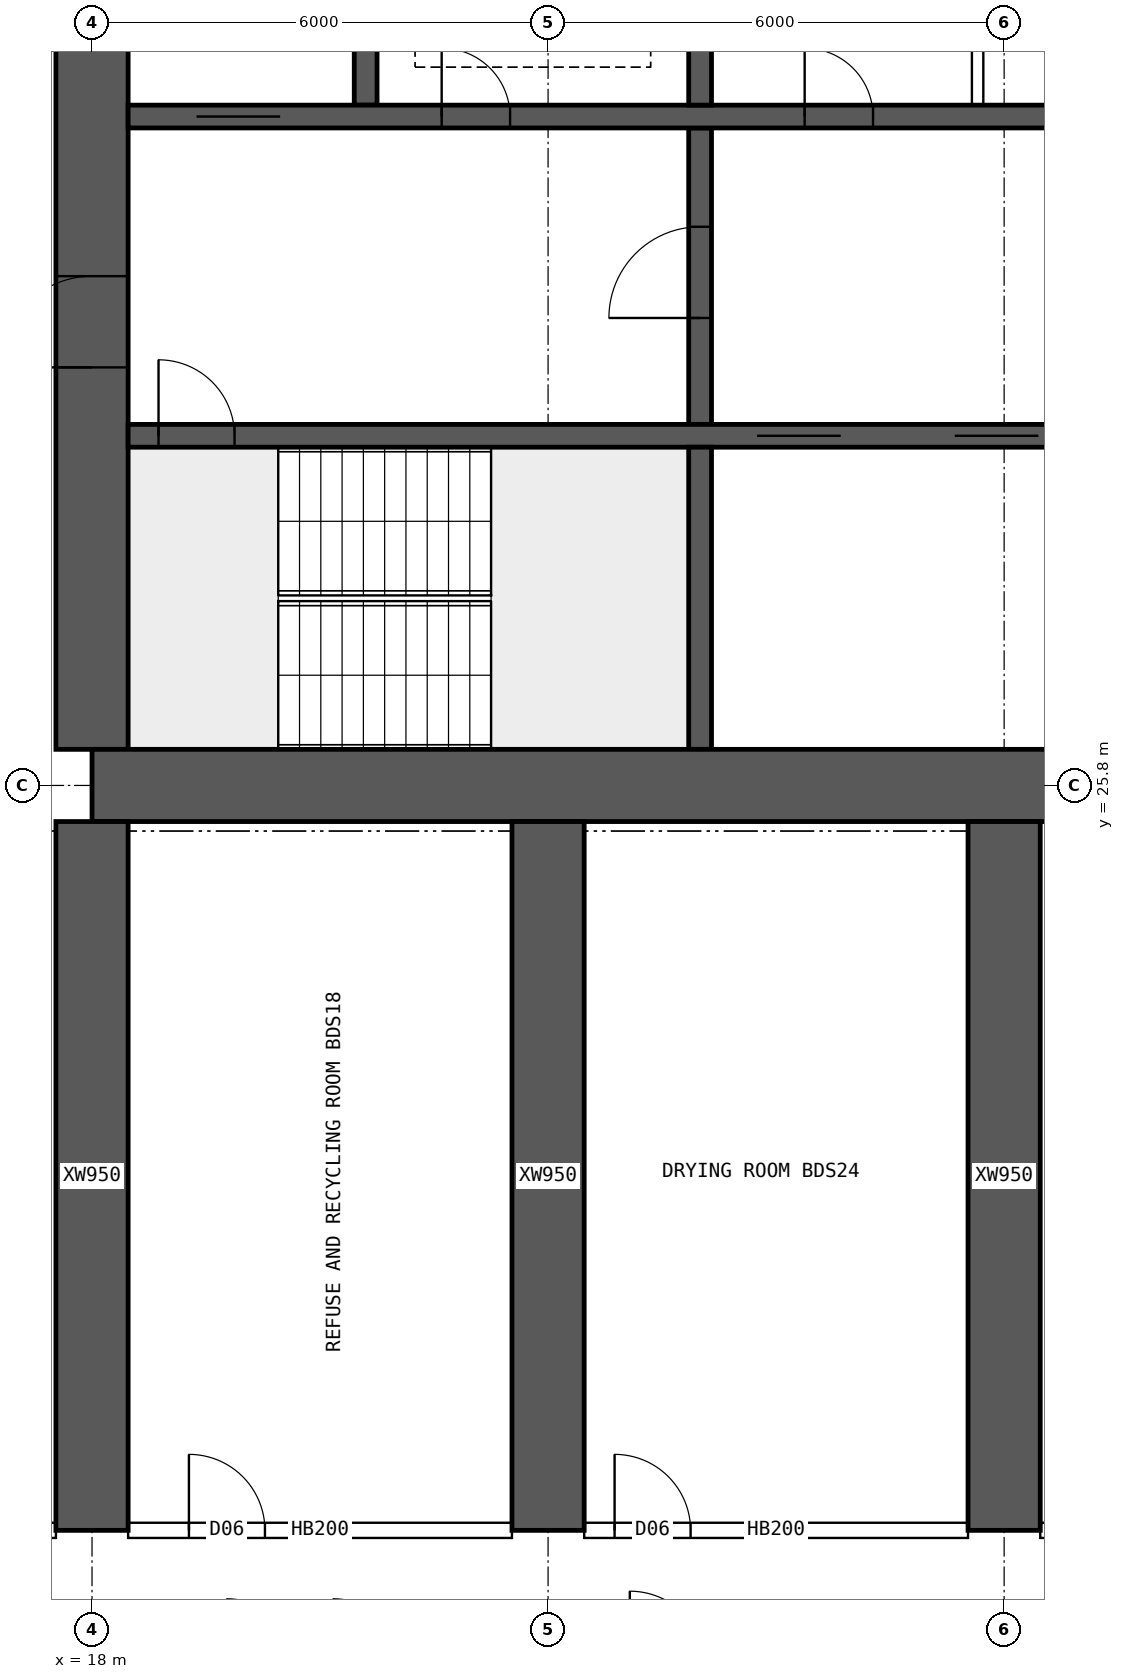
"""IFC4 building model, lengths in metres.
Left out: names, types, materials, properties, quantities, classifications, styles, units other than length and angle.
Written with IfcOpenShell. Run it as: python <this file> out.ifc"""

import sys

from ifc_helpers import new_model, si_unit, direction, frame, frame_2d, origin, place, context, subcontext, project, spatial, rectangle, extrude, element, fill, save


model = new_model("IFC4")
c1 = context("Model", 3, precision=1e-05, world=origin(), true_north=direction((0.0, 1.0)))
c2 = subcontext(c1, "Body", "Model", "MODEL_VIEW")
j1 = project(units=[si_unit("LENGTHUNIT", "METRE"), si_unit("PLANEANGLEUNIT", "RADIAN")], contexts=[c1])
p1 = place(None, origin())
s1 = spatial("IfcSite", under=j1, at=p1, CompositionType="ELEMENT")
p2 = place(p1, origin())
s2 = spatial("IfcBuilding", under=s1, at=p2, CompositionType="ELEMENT")
p3 = place(p2, frame((0.0, 0.0, 110.65)))
s3 = spatial("IfcBuildingStorey", under=s2, at=p3, CompositionType="ELEMENT", Elevation=110.65)
p4 = place(p3, frame((18.0, 25.8, 0.0), z_axis=(0.0, 0.0, 1.0), x_axis=(1.0, 0.0, 0.0)))
e1 = element("IfcWall", 1, at=p4, inside=s3, PredefinedType="SHEAR", context=c2, shape_type="SweptSolid", body=[
    extrude(rectangle(XDim=48.0, YDim=0.95, at=frame_2d((24.0, 0.0))), origin(), (0.0, 0.0, 1.0), 3.75),
])
p5 = place(p3, frame((18.0, 26.275, 0.0), z_axis=(0.0, 0.0, 1.0), x_axis=(0.0, 1.0, 0.0)))
e2 = element("IfcWall", 2, at=p5, inside=s3, PredefinedType="SHEAR", context=c2, shape_type="SweptSolid", body=[
    extrude(rectangle(XDim=11.45, YDim=0.95, at=frame_2d((5.725, 0.0))), origin(), (0.0, 0.0, 1.0), 3.75),
])
p6 = place(p5, frame((5.025, 0.0, 0.0)))
e3 = element("IfcOpeningElement", 3, at=p6, cuts=e2, PredefinedType="OPENING", context=c2, shape_type="SweptSolid", body=[
    extrude(rectangle(XDim=1.2, YDim=2.1, at=frame_2d((0.6, 1.05))), frame((0.0, 0.485, 0.0), z_axis=(0.0, -1.0, 0.0), x_axis=(1.0, 0.0, 0.0)), (0.0, 0.0, 1.0), 0.97),
])
p7 = place(p3, frame((18.475, 30.4, 0.0), z_axis=(0.0, 0.0, 1.0), x_axis=(1.0, 0.0, 0.0)))
e4 = element("IfcWall", 4, at=p7, inside=s3, PredefinedType="SHEAR", context=c2, shape_type="SweptSolid", body=[
    extrude(rectangle(XDim=47.05, YDim=0.3, at=frame_2d((23.525, 0.0))), origin(), (0.0, 0.0, 1.0), 3.75),
])
p8 = place(p7, frame((0.4, 0.0, 0.0)))
e5 = element("IfcOpeningElement", 5, at=p8, cuts=e4, PredefinedType="OPENING", context=c2, shape_type="SweptSolid", body=[
    extrude(rectangle(XDim=1.0, YDim=2.1, at=frame_2d((0.5, 1.05))), frame((0.0, 0.16, 0.0), z_axis=(0.0, -1.0, 0.0), x_axis=(1.0, 0.0, 0.0)), (0.0, 0.0, 1.0), 0.32),
])
p9 = place(p7, frame((45.65, 0.0, 0.0)))
e6 = element("IfcOpeningElement", 6, at=p9, cuts=e4, PredefinedType="OPENING", context=c2, shape_type="SweptSolid", body=[
    extrude(rectangle(XDim=1.0, YDim=2.1, at=frame_2d((0.5, 1.05))), frame((0.0, 0.16, 0.0), z_axis=(0.0, -1.0, 0.0), x_axis=(1.0, 0.0, 0.0)), (0.0, 0.0, 1.0), 0.32),
])
p10 = place(p7, frame((8.275, 0.0, 0.0)))
e7 = element("IfcOpeningElement", 7, at=p10, cuts=e4, PredefinedType="OPENING", context=c2, shape_type="SweptSolid", body=[
    extrude(rectangle(XDim=1.1, YDim=2.1, at=frame_2d((0.55, 1.05))), frame((0.0, 0.16, 0.0), z_axis=(0.0, -1.0, 0.0), x_axis=(1.0, 0.0, 0.0)), (0.0, 0.0, 1.0), 0.32),
])
p11 = place(p7, frame((10.875, 0.0, 0.0)))
e8 = element("IfcOpeningElement", 8, at=p11, cuts=e4, PredefinedType="OPENING", context=c2, shape_type="SweptSolid", body=[
    extrude(rectangle(XDim=1.1, YDim=2.1, at=frame_2d((0.55, 1.05))), frame((0.0, 0.16, 0.0), z_axis=(0.0, -1.0, 0.0), x_axis=(1.0, 0.0, 0.0)), (0.0, 0.0, 1.0), 0.32),
])
p12 = place(p7, frame((13.475, 0.0, 0.0)))
e9 = element("IfcOpeningElement", 9, at=p12, cuts=e4, PredefinedType="OPENING", context=c2, shape_type="SweptSolid", body=[
    extrude(rectangle(XDim=1.1, YDim=2.1, at=frame_2d((0.55, 1.05))), frame((0.0, 0.16, 0.0), z_axis=(0.0, -1.0, 0.0), x_axis=(1.0, 0.0, 0.0)), (0.0, 0.0, 1.0), 0.32),
])
p13 = place(p7, frame((16.075, 0.0, 0.0)))
e10 = element("IfcOpeningElement", 10, at=p13, cuts=e4, PredefinedType="OPENING", context=c2, shape_type="SweptSolid", body=[
    extrude(rectangle(XDim=1.1, YDim=2.1, at=frame_2d((0.55, 1.05))), frame((0.0, 0.16, 0.0), z_axis=(0.0, -1.0, 0.0), x_axis=(1.0, 0.0, 0.0)), (0.0, 0.0, 1.0), 0.32),
])
p14 = place(p7, frame((18.85, 0.0, 0.0)))
e11 = element("IfcOpeningElement", 11, at=p14, cuts=e4, PredefinedType="OPENING", context=c2, shape_type="SweptSolid", body=[
    extrude(rectangle(XDim=0.9, YDim=2.1, at=frame_2d((0.45, 1.05))), frame((0.0, 0.16, 0.0), z_axis=(0.0, -1.0, 0.0), x_axis=(1.0, 0.0, 0.0)), (0.0, 0.0, 1.0), 0.32),
])
p15 = place(p7, frame((30.142, 0.0, 0.0)))
e12 = element("IfcOpeningElement", 12, at=p15, cuts=e4, PredefinedType="OPENING", context=c2, shape_type="SweptSolid", body=[
    extrude(rectangle(XDim=1.1, YDim=2.1, at=frame_2d((0.55, 1.05))), frame((0.0, 0.16, 0.0), z_axis=(0.0, -1.0, 0.0), x_axis=(1.0, 0.0, 0.0)), (0.0, 0.0, 1.0), 0.32),
])
p16 = place(p7, frame((33.675, 0.0, 0.0)))
e13 = element("IfcOpeningElement", 13, at=p16, cuts=e4, PredefinedType="OPENING", context=c2, shape_type="SweptSolid", body=[
    extrude(rectangle(XDim=1.1, YDim=2.1, at=frame_2d((0.55, 1.05))), frame((0.0, 0.16, 0.0), z_axis=(0.0, -1.0, 0.0), x_axis=(1.0, 0.0, 0.0)), (0.0, 0.0, 1.0), 0.32),
])
p17 = place(p7, frame((37.208, 0.0, 0.0)))
e14 = element("IfcOpeningElement", 14, at=p17, cuts=e4, PredefinedType="OPENING", context=c2, shape_type="SweptSolid", body=[
    extrude(rectangle(XDim=1.1, YDim=2.1, at=frame_2d((0.55, 1.05))), frame((0.0, 0.16, 0.0), z_axis=(0.0, -1.0, 0.0), x_axis=(1.0, 0.0, 0.0)), (0.0, 0.0, 1.0), 0.32),
])
p18 = place(p3, frame((18.475, 34.6, 0.0), z_axis=(0.0, 0.0, 1.0), x_axis=(1.0, 0.0, 0.0)))
e15 = element("IfcWall", 15, at=p18, inside=s3, PredefinedType="SHEAR", context=c2, shape_type="SweptSolid", body=[
    extrude(rectangle(XDim=47.05, YDim=0.3, at=frame_2d((23.525, 0.0))), origin(), (0.0, 0.0, 1.0), 3.75),
])
p19 = place(p18, frame((0.9, 0.0, 0.0)))
e16 = element("IfcOpeningElement", 16, at=p19, cuts=e15, PredefinedType="OPENING", context=c2, shape_type="SweptSolid", body=[
    extrude(rectangle(XDim=1.1, YDim=2.1, at=frame_2d((0.55, 1.05))), frame((0.0, 0.16, 0.0), z_axis=(0.0, -1.0, 0.0), x_axis=(1.0, 0.0, 0.0)), (0.0, 0.0, 1.0), 0.32),
])
p20 = place(p18, frame((45.05, 0.0, 0.0)))
e17 = element("IfcOpeningElement", 17, at=p20, cuts=e15, PredefinedType="OPENING", context=c2, shape_type="SweptSolid", body=[
    extrude(rectangle(XDim=1.1, YDim=2.1, at=frame_2d((0.55, 1.05))), frame((0.0, 0.16, 0.0), z_axis=(0.0, -1.0, 0.0), x_axis=(1.0, 0.0, 0.0)), (0.0, 0.0, 1.0), 0.32),
])
p21 = place(p18, frame((4.125, 0.0, 0.0)))
e18 = element("IfcOpeningElement", 18, at=p21, cuts=e15, PredefinedType="OPENING", context=c2, shape_type="SweptSolid", body=[
    extrude(rectangle(XDim=0.9, YDim=2.1, at=frame_2d((0.45, 1.05))), frame((0.0, 0.16, 0.0), z_axis=(0.0, -1.0, 0.0), x_axis=(1.0, 0.0, 0.0)), (0.0, 0.0, 1.0), 0.32),
])
p22 = place(p18, frame((42.025, 0.0, 0.0)))
e19 = element("IfcOpeningElement", 19, at=p22, cuts=e15, PredefinedType="OPENING", context=c2, shape_type="SweptSolid", body=[
    extrude(rectangle(XDim=0.9, YDim=2.1, at=frame_2d((0.45, 1.05))), frame((0.0, 0.16, 0.0), z_axis=(0.0, -1.0, 0.0), x_axis=(1.0, 0.0, 0.0)), (0.0, 0.0, 1.0), 0.32),
])
p23 = place(p18, frame((8.9, 0.0, 0.0)))
e20 = element("IfcOpeningElement", 20, at=p23, cuts=e15, PredefinedType="OPENING", context=c2, shape_type="SweptSolid", body=[
    extrude(rectangle(XDim=0.9, YDim=2.1, at=frame_2d((0.45, 1.05))), frame((0.0, 0.16, 0.0), z_axis=(0.0, -1.0, 0.0), x_axis=(1.0, 0.0, 0.0)), (0.0, 0.0, 1.0), 0.32),
])
p24 = place(p18, frame((12.874, 0.0, 0.0)))
e21 = element("IfcOpeningElement", 21, at=p24, cuts=e15, PredefinedType="OPENING", context=c2, shape_type="SweptSolid", body=[
    extrude(rectangle(XDim=0.9, YDim=2.1, at=frame_2d((0.45, 1.05))), frame((0.0, 0.16, 0.0), z_axis=(0.0, -1.0, 0.0), x_axis=(1.0, 0.0, 0.0)), (0.0, 0.0, 1.0), 0.32),
])
p25 = place(p18, frame((16.521, 0.0, 0.0)))
e22 = element("IfcOpeningElement", 22, at=p25, cuts=e15, PredefinedType="OPENING", context=c2, shape_type="SweptSolid", body=[
    extrude(rectangle(XDim=0.9, YDim=2.1, at=frame_2d((0.45, 1.05))), frame((0.0, 0.16, 0.0), z_axis=(0.0, -1.0, 0.0), x_axis=(1.0, 0.0, 0.0)), (0.0, 0.0, 1.0), 0.32),
])
p26 = place(p18, frame((20.28, 0.0, 0.0)))
e23 = element("IfcOpeningElement", 23, at=p26, cuts=e15, PredefinedType="OPENING", context=c2, shape_type="SweptSolid", body=[
    extrude(rectangle(XDim=0.9, YDim=2.1, at=frame_2d((0.45, 1.05))), frame((0.0, 0.16, 0.0), z_axis=(0.0, -1.0, 0.0), x_axis=(1.0, 0.0, 0.0)), (0.0, 0.0, 1.0), 0.32),
])
p27 = place(p18, frame((24.686, 0.0, 0.0)))
e24 = element("IfcOpeningElement", 24, at=p27, cuts=e15, PredefinedType="OPENING", context=c2, shape_type="SweptSolid", body=[
    extrude(rectangle(XDim=0.9, YDim=2.1, at=frame_2d((0.45, 1.05))), frame((0.0, 0.16, 0.0), z_axis=(0.0, -1.0, 0.0), x_axis=(1.0, 0.0, 0.0)), (0.0, 0.0, 1.0), 0.32),
])
p28 = place(p18, frame((27.483, 0.0, 0.0)))
e25 = element("IfcOpeningElement", 25, at=p28, cuts=e15, PredefinedType="OPENING", context=c2, shape_type="SweptSolid", body=[
    extrude(rectangle(XDim=0.9, YDim=2.1, at=frame_2d((0.45, 1.05))), frame((0.0, 0.16, 0.0), z_axis=(0.0, -1.0, 0.0), x_axis=(1.0, 0.0, 0.0)), (0.0, 0.0, 1.0), 0.32),
])
p29 = place(p18, frame((29.856, 0.0, 0.0)))
e26 = element("IfcOpeningElement", 26, at=p29, cuts=e15, PredefinedType="OPENING", context=c2, shape_type="SweptSolid", body=[
    extrude(rectangle(XDim=0.9, YDim=2.1, at=frame_2d((0.45, 1.05))), frame((0.0, 0.16, 0.0), z_axis=(0.0, -1.0, 0.0), x_axis=(1.0, 0.0, 0.0)), (0.0, 0.0, 1.0), 0.32),
])
p30 = place(p18, frame((35.326, 0.0, 0.0)))
e27 = element("IfcOpeningElement", 27, at=p30, cuts=e15, PredefinedType="OPENING", context=c2, shape_type="SweptSolid", body=[
    extrude(rectangle(XDim=0.9, YDim=2.1, at=frame_2d((0.45, 1.05))), frame((0.0, 0.16, 0.0), z_axis=(0.0, -1.0, 0.0), x_axis=(1.0, 0.0, 0.0)), (0.0, 0.0, 1.0), 0.32),
])
p31 = place(p3, frame((26.0, 26.275, 0.0), z_axis=(0.0, 0.0, 1.0), x_axis=(0.0, 1.0, 0.0)))
e28 = element("IfcWall", 28, at=p31, inside=s3, PredefinedType="SHEAR", context=c2, shape_type="SweptSolid", body=[
    extrude(rectangle(XDim=3.975, YDim=0.3, at=frame_2d((1.988, 0.0))), origin(), (0.0, 0.0, 1.0), 3.75),
])
p32 = place(p3, frame((26.0, 30.55, 0.0), z_axis=(0.0, 0.0, 1.0), x_axis=(0.0, 1.0, 0.0)))
e29 = element("IfcWall", 29, at=p32, inside=s3, PredefinedType="SHEAR", context=c2, shape_type="SweptSolid", body=[
    extrude(rectangle(XDim=3.9, YDim=0.3, at=frame_2d((1.95, 0.0))), origin(), (0.0, 0.0, 1.0), 3.75),
])
p33 = place(p32, frame((1.4, 0.0, 0.0)))
e30 = element("IfcOpeningElement", 30, at=p33, cuts=e29, PredefinedType="OPENING", context=c2, shape_type="SweptSolid", body=[
    extrude(rectangle(XDim=1.2, YDim=2.1, at=frame_2d((0.6, 1.05))), frame((0.0, 0.16, 0.0), z_axis=(0.0, -1.0, 0.0), x_axis=(1.0, 0.0, 0.0)), (0.0, 0.0, 1.0), 0.32),
])
for number, where, z_axis, x_axis in (
    (31, (21.6, 34.75, 0.0), (0.0, 0.0, 1.0), (0.0, 1.0, 0.0)),
    (32, (26.0, 34.75, 0.0), (0.0, 0.0, 1.0), (0.0, 1.0, 0.0)),
):
    element("IfcWall", number, at=place(p3, frame(where, z_axis=z_axis, x_axis=x_axis)), inside=s3, PredefinedType="SHEAR", context=c2, shape_type="SweptSolid", body=[
        extrude(rectangle(XDim=2.975, YDim=0.3, at=frame_2d((1.488, 0.0))), origin(), (0.0, 0.0, 1.0), 3.75),
    ])
for number, where, z_axis, x_axis in (
    (33, (18.0, 16.0, 0.0), (0.0, 0.0, 1.0), (0.0, 1.0, 0.0)),
    (34, (24.0, 16.0, 0.0), (0.0, 0.0, 1.0), (0.0, 1.0, 0.0)),
    (35, (30.0, 16.0, 0.0), (0.0, 0.0, 1.0), (0.0, 1.0, 0.0)),
):
    element("IfcWall", number, at=place(p3, frame(where, z_axis=z_axis, x_axis=x_axis)), inside=s3, PredefinedType="SHEAR", context=c2, shape_type="SweptSolid", body=[
        extrude(rectangle(XDim=9.325, YDim=0.95, at=frame_2d((4.663, 0.0))), origin(), (0.0, 0.0, 1.0), 3.75),
    ])
p34 = place(p3, frame((29.651, 34.75, 0.0), z_axis=(0.0, 0.0, 1.0), x_axis=(0.0, 1.0, 0.0)))
e36 = element("IfcWall", 36, at=p34, inside=s3, PredefinedType="SOLIDWALL", context=c2, shape_type="SweptSolid", body=[
    extrude(rectangle(XDim=2.975, YDim=0.15, at=frame_2d((1.488, 0.0))), origin(), (0.0, 0.0, 1.0), 3.3),
])
p35 = place(p3, frame((12.475, 16.0, 0.0), z_axis=(0.0, 0.0, 1.0), x_axis=(1.0, 0.0, 0.0)))
e37 = element("IfcWall", 37, at=p35, inside=s3, PredefinedType="SOLIDWALL", context=c2, shape_type="SweptSolid", body=[
    extrude(rectangle(XDim=5.05, YDim=0.2, at=frame_2d((2.525, 0.0))), origin(), (0.0, 0.0, 1.0), 3.3),
])
p36 = place(p35, frame((3.325, 0.0, 0.0)))
e38 = element("IfcOpeningElement", 38, at=p36, cuts=e37, PredefinedType="OPENING", context=c2, shape_type="SweptSolid", body=[
    extrude(rectangle(XDim=1.6, YDim=2.1, at=frame_2d((0.8, 1.05))), frame((0.0, 0.11, 0.0), z_axis=(0.0, -1.0, 0.0), x_axis=(1.0, 0.0, 0.0)), (0.0, 0.0, 1.0), 0.22),
])
p37 = place(p3, frame((18.475, 16.0, 0.0), z_axis=(0.0, 0.0, 1.0), x_axis=(1.0, 0.0, 0.0)))
e39 = element("IfcWall", 39, at=p37, inside=s3, PredefinedType="SOLIDWALL", context=c2, shape_type="SweptSolid", body=[
    extrude(rectangle(XDim=5.05, YDim=0.2, at=frame_2d((2.525, 0.0))), origin(), (0.0, 0.0, 1.0), 3.3),
])
p38 = place(p37, frame((0.8, 0.0, 0.0)))
e40 = element("IfcOpeningElement", 40, at=p38, cuts=e39, PredefinedType="OPENING", context=c2, shape_type="SweptSolid", body=[
    extrude(rectangle(XDim=1.0, YDim=2.1, at=frame_2d((0.5, 1.05))), frame((0.0, 0.11, 0.0), z_axis=(0.0, -1.0, 0.0), x_axis=(1.0, 0.0, 0.0)), (0.0, 0.0, 1.0), 0.22),
])
p39 = place(p3, frame((24.475, 16.0, 0.0), z_axis=(0.0, 0.0, 1.0), x_axis=(1.0, 0.0, 0.0)))
e41 = element("IfcWall", 41, at=p39, inside=s3, PredefinedType="SOLIDWALL", context=c2, shape_type="SweptSolid", body=[
    extrude(rectangle(XDim=5.05, YDim=0.2, at=frame_2d((2.525, 0.0))), origin(), (0.0, 0.0, 1.0), 3.3),
])
p40 = place(p39, frame((0.4, 0.0, 0.0)))
e42 = element("IfcOpeningElement", 42, at=p40, cuts=e41, PredefinedType="OPENING", context=c2, shape_type="SweptSolid", body=[
    extrude(rectangle(XDim=1.0, YDim=2.1, at=frame_2d((0.5, 1.05))), frame((0.0, 0.11, 0.0), z_axis=(0.0, -1.0, 0.0), x_axis=(1.0, 0.0, 0.0)), (0.0, 0.0, 1.0), 0.22),
])
p41 = place(p3, frame((30.475, 16.0, 0.0), z_axis=(0.0, 0.0, 1.0), x_axis=(1.0, 0.0, 0.0)))
e43 = element("IfcWall", 43, at=p41, inside=s3, PredefinedType="SOLIDWALL", context=c2, shape_type="SweptSolid", body=[
    extrude(rectangle(XDim=5.05, YDim=0.2, at=frame_2d((2.525, 0.0))), origin(), (0.0, 0.0, 1.0), 3.3),
])
p42 = place(p41, frame((0.35, 0.0, 0.0)))
e44 = element("IfcOpeningElement", 44, at=p42, cuts=e43, PredefinedType="OPENING", context=c2, shape_type="SweptSolid", body=[
    extrude(rectangle(XDim=0.9, YDim=2.1, at=frame_2d((0.45, 1.05))), frame((0.0, 0.11, 0.0), z_axis=(0.0, -1.0, 0.0), x_axis=(1.0, 0.0, 0.0)), (0.0, 0.0, 1.0), 0.22),
])
p43 = place(p41, frame((3.215, 0.0, 0.0)))
e45 = element("IfcOpeningElement", 45, at=p43, cuts=e43, PredefinedType="OPENING", context=c2, shape_type="SweptSolid", body=[
    extrude(rectangle(XDim=0.9, YDim=2.1, at=frame_2d((0.45, 1.05))), frame((0.0, 0.11, 0.0), z_axis=(0.0, -1.0, 0.0), x_axis=(1.0, 0.0, 0.0)), (0.0, 0.0, 1.0), 0.22),
])
p44 = place(p6, origin())
e46 = element("IfcDoor", 46, at=p44, inside=s3, OperationType="SINGLE_SWING_LEFT", PredefinedType="DOOR", context=c2, shape_type="SweptSolid", body=[
    extrude(rectangle(XDim=1.2, YDim=2.1, at=frame_2d((0.6, 1.05))), frame((0.0, 0.025, 0.0), z_axis=(0.0, -1.0, 0.0), x_axis=(1.0, 0.0, 0.0)), (0.0, 0.0, 1.0), 0.05),
])
fill(e3, e46)
p45 = place(p8, origin())
e47 = element("IfcDoor", 47, at=p45, inside=s3, OperationType="SINGLE_SWING_LEFT", PredefinedType="DOOR", context=c2, shape_type="SweptSolid", body=[
    extrude(rectangle(XDim=1.0, YDim=2.1, at=frame_2d((0.5, 1.05))), frame((0.0, 0.025, 0.0), z_axis=(0.0, -1.0, 0.0), x_axis=(1.0, 0.0, 0.0)), (0.0, 0.0, 1.0), 0.05),
])
fill(e5, e47)
p46 = place(p19, origin())
e48 = element("IfcDoor", 48, at=p46, inside=s3, OperationType="DOUBLE_DOOR_SLIDING", PredefinedType="DOOR", context=c2, shape_type="SweptSolid", body=[
    extrude(rectangle(XDim=1.1, YDim=2.1, at=frame_2d((0.55, 1.05))), frame((0.0, 0.025, 0.0), z_axis=(0.0, -1.0, 0.0), x_axis=(1.0, 0.0, 0.0)), (0.0, 0.0, 1.0), 0.05),
])
fill(e16, e48)
p47 = place(p21, origin())
e49 = element("IfcDoor", 49, at=p47, inside=s3, OperationType="SINGLE_SWING_LEFT", PredefinedType="DOOR", context=c2, shape_type="SweptSolid", body=[
    extrude(rectangle(XDim=0.9, YDim=2.1, at=frame_2d((0.45, 1.05))), frame((0.0, 0.025, 0.0), z_axis=(0.0, -1.0, 0.0), x_axis=(1.0, 0.0, 0.0)), (0.0, 0.0, 1.0), 0.05),
])
fill(e18, e49)
p48 = place(p33, origin())
e50 = element("IfcDoor", 50, at=p48, inside=s3, OperationType="SINGLE_SWING_LEFT", PredefinedType="DOOR", context=c2, shape_type="SweptSolid", body=[
    extrude(rectangle(XDim=1.2, YDim=2.1, at=frame_2d((0.6, 1.05))), frame((0.0, 0.025, 0.0), z_axis=(0.0, -1.0, 0.0), x_axis=(1.0, 0.0, 0.0)), (0.0, 0.0, 1.0), 0.05),
])
fill(e30, e50)
p49 = place(p23, origin())
e51 = element("IfcDoor", 51, at=p49, inside=s3, OperationType="SINGLE_SWING_LEFT", PredefinedType="DOOR", context=c2, shape_type="SweptSolid", body=[
    extrude(rectangle(XDim=0.9, YDim=2.1, at=frame_2d((0.45, 1.05))), frame((0.0, 0.025, 0.0), z_axis=(0.0, -1.0, 0.0), x_axis=(1.0, 0.0, 0.0)), (0.0, 0.0, 1.0), 0.05),
])
fill(e20, e51)
p50 = place(p10, origin())
e52 = element("IfcDoor", 52, at=p50, inside=s3, OperationType="DOUBLE_DOOR_SLIDING", PredefinedType="DOOR", context=c2, shape_type="SweptSolid", body=[
    extrude(rectangle(XDim=1.1, YDim=2.1, at=frame_2d((0.55, 1.05))), frame((0.0, 0.025, 0.0), z_axis=(0.0, -1.0, 0.0), x_axis=(1.0, 0.0, 0.0)), (0.0, 0.0, 1.0), 0.05),
])
fill(e7, e52)
p51 = place(p11, origin())
e53 = element("IfcDoor", 53, at=p51, inside=s3, OperationType="DOUBLE_DOOR_SLIDING", PredefinedType="DOOR", context=c2, shape_type="SweptSolid", body=[
    extrude(rectangle(XDim=1.1, YDim=2.1, at=frame_2d((0.55, 1.05))), frame((0.0, 0.025, 0.0), z_axis=(0.0, -1.0, 0.0), x_axis=(1.0, 0.0, 0.0)), (0.0, 0.0, 1.0), 0.05),
])
fill(e8, e53)
p52 = place(p38, origin())
e54 = element("IfcDoor", 54, at=p52, inside=s3, OperationType="SINGLE_SWING_LEFT", PredefinedType="DOOR", context=c2, shape_type="SweptSolid", body=[
    extrude(rectangle(XDim=1.0, YDim=2.1, at=frame_2d((0.5, 1.05))), frame((0.0, 0.025, 0.0), z_axis=(0.0, -1.0, 0.0), x_axis=(1.0, 0.0, 0.0)), (0.0, 0.0, 1.0), 0.05),
])
fill(e40, e54)
p53 = place(p40, origin())
e55 = element("IfcDoor", 55, at=p53, inside=s3, OperationType="SINGLE_SWING_LEFT", PredefinedType="DOOR", context=c2, shape_type="SweptSolid", body=[
    extrude(rectangle(XDim=1.0, YDim=2.1, at=frame_2d((0.5, 1.05))), frame((0.0, 0.025, 0.0), z_axis=(0.0, -1.0, 0.0), x_axis=(1.0, 0.0, 0.0)), (0.0, 0.0, 1.0), 0.05),
])
fill(e42, e55)
save(model, sys.argv[1])
